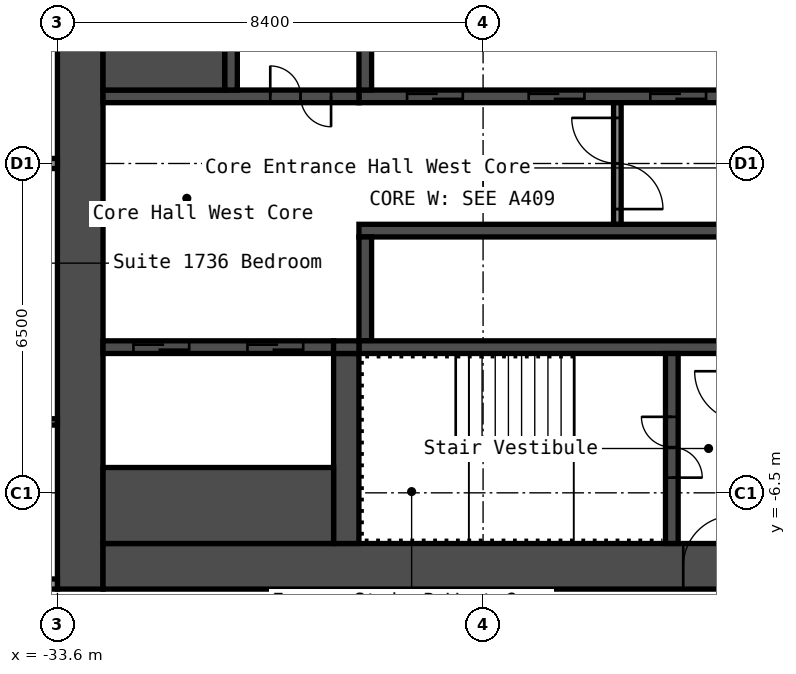
"""IFC4 building model, lengths in metres.
Left out: names, types, materials, properties, quantities, classifications, styles, units other than length and angle.
Written with IfcOpenShell. Run it as: python <this file> out.ifc"""

import sys

from ifc_helpers import new_model, si_unit, direction, frame, frame_2d, origin, place, context, subcontext, project, spatial, rectangle, extrude, element, fill, save


model = new_model("IFC4")
c1 = context("Model", 3, precision=1e-05, world=origin(), true_north=direction((0.0, 1.0)))
c2 = subcontext(c1, "Body", "Model", "MODEL_VIEW")
j1 = project(units=[si_unit("LENGTHUNIT", "METRE"), si_unit("PLANEANGLEUNIT", "RADIAN")], contexts=[c1])
p1 = place(None, origin())
s1 = spatial("IfcSite", under=j1, at=p1, CompositionType="ELEMENT")
p2 = place(p1, origin())
s2 = spatial("IfcBuilding", under=s1, at=p2, CompositionType="ELEMENT")
p3 = place(p2, frame((0.0, 0.0, 61.4)))
s3 = spatial("IfcBuildingStorey", under=s2, at=p3, CompositionType="ELEMENT", Elevation=61.4)
p4 = place(p3, frame((-33.15, -8.4, 0.0), z_axis=(0.0, 0.0, 1.0), x_axis=(0.0, 1.0, 0.0)))
e1 = element("IfcWall", 1, at=p4, inside=s3, PredefinedType="SHEAR", context=c2, shape_type="SweptSolid", body=[
    extrude(rectangle(XDim=16.8, YDim=0.9, at=frame_2d((8.4, 0.0))), origin(), (0.0, 0.0, 1.0), 2.9),
])
p5 = place(p3, frame((-32.7, -7.95, 0.0), z_axis=(0.0, 0.0, 1.0), x_axis=(1.0, 0.0, 0.0)))
e2 = element("IfcWall", 2, at=p5, inside=s3, PredefinedType="SHEAR", context=c2, shape_type="SweptSolid", body=[
    extrude(rectangle(XDim=15.0, YDim=0.9, at=frame_2d((7.5, 0.0))), origin(), (0.0, 0.0, 1.0), 2.9),
])
p6 = place(p5, frame((11.45, 0.0, 0.0)))
e3 = element("IfcOpeningElement", 3, at=p6, cuts=e2, PredefinedType="OPENING", context=c2, shape_type="SweptSolid", body=[
    extrude(rectangle(XDim=1.0, YDim=2.1, at=frame_2d((0.5, 1.05))), frame((0.0, 0.46, 0.0), z_axis=(0.0, -1.0, 0.0), x_axis=(1.0, 0.0, 0.0)), (0.0, 0.0, 1.0), 0.92),
])
p7 = place(p3, frame((-27.65, 1.325, 0.0), z_axis=(0.0, 0.0, 1.0), x_axis=(1.0, 0.0, 0.0)))
e4 = element("IfcWall", 4, at=p7, inside=s3, PredefinedType="SHEAR", context=c2, shape_type="SweptSolid", body=[
    extrude(rectangle(XDim=7.5, YDim=0.25, at=frame_2d((3.75, 0.0))), origin(), (0.0, 0.0, 1.0), 2.9),
])
p8 = place(p7, frame((5.75, 0.0, 0.0)))
e5 = element("IfcOpeningElement", 5, at=p8, cuts=e4, PredefinedType="OPENING", context=c2, shape_type="SweptSolid", body=[
    extrude(rectangle(XDim=1.1, YDim=2.1, at=frame_2d((0.55, 1.05))), frame((0.0, 0.135, 0.0), z_axis=(0.0, -1.0, 0.0), x_axis=(1.0, 0.0, 0.0)), (0.0, 0.0, 1.0), 0.27),
])
p9 = place(p7, frame((3.35, 0.0, 0.0)))
e6 = element("IfcOpeningElement", 6, at=p9, cuts=e4, PredefinedType="OPENING", context=c2, shape_type="SweptSolid", body=[
    extrude(rectangle(XDim=1.1, YDim=2.1, at=frame_2d((0.55, 1.05))), frame((0.0, 0.135, 0.0), z_axis=(0.0, -1.0, 0.0), x_axis=(1.0, 0.0, 0.0)), (0.0, 0.0, 1.0), 0.27),
])
p10 = place(p7, frame((0.95, 0.0, 0.0)))
e7 = element("IfcOpeningElement", 7, at=p10, cuts=e4, PredefinedType="OPENING", context=c2, shape_type="SweptSolid", body=[
    extrude(rectangle(XDim=1.1, YDim=2.1, at=frame_2d((0.55, 1.05))), frame((0.0, 0.135, 0.0), z_axis=(0.0, -1.0, 0.0), x_axis=(1.0, 0.0, 0.0)), (0.0, 0.0, 1.0), 0.27),
])
p11 = place(p3, frame((-27.525, 1.45, 0.0), z_axis=(0.0, 0.0, 1.0), x_axis=(0.0, 1.0, 0.0)))
e8 = element("IfcWall", 8, at=p11, inside=s3, PredefinedType="SHEAR", context=c2, shape_type="SweptSolid", body=[
    extrude(rectangle(XDim=2.05, YDim=0.25, at=frame_2d((1.025, 0.0))), origin(), (0.0, 0.0, 1.0), 2.9),
])
p12 = place(p3, frame((-32.7, 1.325, 0.0), z_axis=(0.0, 0.0, 1.0), x_axis=(1.0, 0.0, 0.0)))
e9 = element("IfcWall", 9, at=p12, inside=s3, PredefinedType="SHEAR", context=c2, shape_type="SweptSolid", body=[
    extrude(rectangle(XDim=5.05, YDim=0.25, at=frame_2d((2.525, 0.0))), origin(), (0.0, 0.0, 1.0), 2.9),
])
p13 = place(p12, frame((3.3, 0.0, 0.0)))
e10 = element("IfcOpeningElement", 10, at=p13, cuts=e9, PredefinedType="OPENING", context=c2, shape_type="SweptSolid", body=[
    extrude(rectangle(XDim=1.2, YDim=2.1, at=frame_2d((0.6, 1.05))), frame((0.0, 0.135, 0.0), z_axis=(0.0, -1.0, 0.0), x_axis=(1.0, 0.0, 0.0)), (0.0, 0.0, 1.0), 0.27),
])
p14 = place(p3, frame((-30.175, 1.45, 0.0), z_axis=(0.0, 0.0, 1.0), x_axis=(0.0, 1.0, 0.0)))
e11 = element("IfcWall", 11, at=p14, inside=s3, PredefinedType="SHEAR", context=c2, shape_type="SweptSolid", body=[
    extrude(rectangle(XDim=6.05, YDim=0.25, at=frame_2d((3.025, 0.0))), origin(), (0.0, 0.0, 1.0), 2.9),
])
p15 = place(p14, frame((2.625, 0.0, 0.0)))
e12 = element("IfcOpeningElement", 12, at=p15, cuts=e11, PredefinedType="OPENING", context=c2, shape_type="SweptSolid", body=[
    extrude(rectangle(XDim=1.1, YDim=2.1, at=frame_2d((0.55, 1.05))), frame((0.0, 0.135, 0.0), z_axis=(0.0, -1.0, 0.0), x_axis=(1.0, 0.0, 0.0)), (0.0, 0.0, 1.0), 0.27),
])
p16 = place(p3, frame((-32.7, 2.375, 0.0), z_axis=(0.0, 0.0, 1.0), x_axis=(1.0, 0.0, 0.0)))
e13 = element("IfcWall", 13, at=p16, inside=s3, PredefinedType="SHEAR", context=c2, shape_type="SweptSolid", body=[
    extrude(rectangle(XDim=2.4, YDim=1.85, at=frame_2d((1.2, 0.0))), origin(), (0.0, 0.0, 1.0), 2.9),
])
p17 = place(p3, frame((-27.65, -1.325, 0.0), z_axis=(0.0, 0.0, 1.0), x_axis=(1.0, 0.0, 0.0)))
e14 = element("IfcWall", 14, at=p17, inside=s3, PredefinedType="SHEAR", context=c2, shape_type="SweptSolid", body=[
    extrude(rectangle(XDim=7.5, YDim=0.25, at=frame_2d((3.75, 0.0))), origin(), (0.0, 0.0, 1.0), 2.9),
])
p18 = place(p3, frame((-27.525, -3.5, 0.0), z_axis=(0.0, 0.0, 1.0), x_axis=(0.0, 1.0, 0.0)))
e15 = element("IfcWall", 15, at=p18, inside=s3, PredefinedType="SHEAR", context=c2, shape_type="SweptSolid", body=[
    extrude(rectangle(XDim=2.05, YDim=0.25, at=frame_2d((1.025, 0.0))), origin(), (0.0, 0.0, 1.0), 2.9),
])
p19 = place(p3, frame((-27.65, -3.625, 0.0), z_axis=(0.0, 0.0, 1.0), x_axis=(1.0, 0.0, 0.0)))
e16 = element("IfcWall", 16, at=p19, inside=s3, PredefinedType="SHEAR", context=c2, shape_type="SweptSolid", body=[
    extrude(rectangle(XDim=7.5, YDim=0.25, at=frame_2d((3.75, 0.0))), origin(), (0.0, 0.0, 1.0), 2.9),
])
p20 = place(p3, frame((-21.475, -7.5, 0.0), z_axis=(0.0, 0.0, 1.0), x_axis=(0.0, 1.0, 0.0)))
e17 = element("IfcWall", 17, at=p20, inside=s3, PredefinedType="SHEAR", context=c2, shape_type="SweptSolid", body=[
    extrude(rectangle(XDim=3.75, YDim=0.25, at=frame_2d((1.875, 0.0))), origin(), (0.0, 0.0, 1.0), 2.9),
])
p21 = place(p20, frame((1.3, 0.0, 0.0)))
e18 = element("IfcOpeningElement", 18, at=p21, cuts=e17, PredefinedType="OPENING", context=c2, shape_type="SweptSolid", body=[
    extrude(rectangle(XDim=1.2, YDim=2.1, at=frame_2d((0.6, 1.05))), frame((0.0, 0.135, 0.0), z_axis=(0.0, -1.0, 0.0), x_axis=(1.0, 0.0, 0.0)), (0.0, 0.0, 1.0), 0.27),
])
p22 = place(p3, frame((-27.9, -7.5, 0.0), z_axis=(0.0, 0.0, 1.0), x_axis=(0.0, 1.0, 0.0)))
e19 = element("IfcWall", 19, at=p22, inside=s3, PredefinedType="SHEAR", context=c2, shape_type="SweptSolid", body=[
    extrude(rectangle(XDim=3.75, YDim=0.5, at=frame_2d((1.875, 0.0))), origin(), (0.0, 0.0, 1.0), 2.9),
])
p23 = place(p3, frame((-32.7, -3.625, 0.0), z_axis=(0.0, 0.0, 1.0), x_axis=(1.0, 0.0, 0.0)))
e20 = element("IfcWall", 20, at=p23, inside=s3, PredefinedType="SHEAR", context=c2, shape_type="SweptSolid", body=[
    extrude(rectangle(XDim=4.55, YDim=0.25, at=frame_2d((2.275, 0.0))), origin(), (0.0, 0.0, 1.0), 2.9),
])
p24 = place(p23, frame((2.85, 0.0, 0.0)))
e21 = element("IfcOpeningElement", 21, at=p24, cuts=e20, PredefinedType="OPENING", context=c2, shape_type="SweptSolid", body=[
    extrude(rectangle(XDim=1.1, YDim=2.1, at=frame_2d((0.55, 1.05))), frame((0.0, 0.135, 0.0), z_axis=(0.0, -1.0, 0.0), x_axis=(1.0, 0.0, 0.0)), (0.0, 0.0, 1.0), 0.27),
])
p25 = place(p23, frame((0.6, 0.0, 0.0)))
e22 = element("IfcOpeningElement", 22, at=p25, cuts=e20, PredefinedType="OPENING", context=c2, shape_type="SweptSolid", body=[
    extrude(rectangle(XDim=1.1, YDim=2.1, at=frame_2d((0.55, 1.05))), frame((0.0, 0.135, 0.0), z_axis=(0.0, -1.0, 0.0), x_axis=(1.0, 0.0, 0.0)), (0.0, 0.0, 1.0), 0.27),
])
p26 = place(p3, frame((-32.7, -6.75, 0.0), z_axis=(0.0, 0.0, 1.0), x_axis=(1.0, 0.0, 0.0)))
e23 = element("IfcWall", 23, at=p26, inside=s3, PredefinedType="SHEAR", context=c2, shape_type="SweptSolid", body=[
    extrude(rectangle(XDim=4.55, YDim=1.5, at=frame_2d((2.275, 0.0))), origin(), (0.0, 0.0, 1.0), 2.9),
])
p27 = place(p3, frame((-28.15, -3.625, 0.0), z_axis=(0.0, 0.0, 1.0), x_axis=(1.0, 0.0, 0.0)))
e24 = element("IfcWall", 24, at=p27, inside=s3, PredefinedType="SHEAR", context=c2, shape_type="SweptSolid", body=[
    extrude(rectangle(XDim=0.5, YDim=0.25, at=frame_2d((0.25, 0.0))), origin(), (0.0, 0.0, 1.0), 2.9),
])
p28 = place(p3, frame((-22.55, -1.2, 0.0), z_axis=(0.0, 0.0, 1.0), x_axis=(0.0, 1.0, 0.0)))
e25 = element("IfcWall", 25, at=p28, inside=s3, PredefinedType="PARTITIONING", context=c2, shape_type="SweptSolid", body=[
    extrude(rectangle(XDim=2.4, YDim=0.15, at=frame_2d((1.2, 0.0))), origin(), (0.0, 0.0, 1.0), 2.9),
])
p29 = place(p28, frame((0.3, 0.0, 0.0)))
e26 = element("IfcOpeningElement", 26, at=p29, cuts=e25, PredefinedType="OPENING", context=c2, shape_type="SweptSolid", body=[
    extrude(rectangle(XDim=1.8, YDim=2.1, at=frame_2d((0.9, 1.05))), frame((0.0, 0.085, 0.0), z_axis=(0.0, -1.0, 0.0), x_axis=(1.0, 0.0, 0.0)), (0.0, 0.0, 1.0), 0.17),
])
p30 = place(p3, frame((-48.6, -8.3, 0.0), z_axis=(0.0, 0.0, 1.0), x_axis=(1.0, 0.0, 0.0)))
e27 = element("IfcWall", 27, at=p30, inside=s3, PredefinedType="PARTITIONING", context=c2, shape_type="SweptSolid", body=[
    extrude(rectangle(XDim=15.0, YDim=0.2, at=frame_2d((7.5, 0.0))), origin(), (0.0, 0.0, 1.0), 2.9),
])
p31 = place(p30, frame((1.1, 0.0, 0.0)))
e28 = element("IfcOpeningElement", 28, at=p31, cuts=e27, PredefinedType="OPENING", context=c2, shape_type="SweptSolid", body=[
    extrude(rectangle(XDim=1.0, YDim=2.1, at=frame_2d((0.5, 1.05))), frame((0.0, 0.11, 0.0), z_axis=(0.0, -1.0, 0.0), x_axis=(1.0, 0.0, 0.0)), (0.0, 0.0, 1.0), 0.22),
])
p32 = place(p30, frame((8.2, 0.0, 0.0)))
e29 = element("IfcOpeningElement", 29, at=p32, cuts=e27, PredefinedType="OPENING", context=c2, shape_type="SweptSolid", body=[
    extrude(rectangle(XDim=1.0, YDim=2.1, at=frame_2d((0.5, 1.05))), frame((0.0, 0.11, 0.0), z_axis=(0.0, -1.0, 0.0), x_axis=(1.0, 0.0, 0.0)), (0.0, 0.0, 1.0), 0.22),
])
p33 = place(p3, frame((-36.538, -5.1, 0.0), z_axis=(0.0, 0.0, 1.0), x_axis=(1.0, 0.0, 0.0)))
e30 = element("IfcWall", 30, at=p33, inside=s3, PredefinedType="PARTITIONING", context=c2, shape_type="SweptSolid", body=[
    extrude(rectangle(XDim=2.938, YDim=0.125, at=frame_2d((1.469, 0.0))), origin(), (0.0, 0.0, 1.0), 2.9),
])
p34 = place(p33, frame((1.038, 0.0, 0.0)))
e31 = element("IfcOpeningElement", 31, at=p34, cuts=e30, PredefinedType="OPENING", context=c2, shape_type="SweptSolid", body=[
    extrude(rectangle(XDim=0.8, YDim=2.1, at=frame_2d((0.4, 1.05))), frame((0.0, 0.073, 0.0), z_axis=(0.0, -1.0, 0.0), x_axis=(1.0, 0.0, 0.0)), (0.0, 0.0, 1.0), 0.145),
])
p35 = place(p3, frame((-48.5, 0.0, 0.0), z_axis=(0.0, 0.0, 1.0), x_axis=(1.0, 0.0, 0.0)))
e32 = element("IfcWall", 32, at=p35, inside=s3, PredefinedType="PARTITIONING", context=c2, shape_type="SweptSolid", body=[
    extrude(rectangle(XDim=14.9, YDim=0.2, at=frame_2d((7.45, 0.0))), origin(), (0.0, 0.0, 1.0), 2.9),
])
p36 = place(p6, origin())
e33 = element("IfcDoor", 33, at=p36, inside=s3, OperationType="SINGLE_SWING_LEFT", PredefinedType="DOOR", context=c2, shape_type="SweptSolid", body=[
    extrude(rectangle(XDim=1.0, YDim=2.1, at=frame_2d((0.5, 1.05))), frame((0.0, 0.025, 0.0), z_axis=(0.0, -1.0, 0.0), x_axis=(1.0, 0.0, 0.0)), (0.0, 0.0, 1.0), 0.05),
])
fill(e3, e33)
p37 = place(p21, origin())
e34 = element("IfcDoor", 34, at=p37, inside=s3, OperationType="DOUBLE_DOOR_SINGLE_SWING", PredefinedType="DOOR", context=c2, shape_type="SweptSolid", body=[
    extrude(rectangle(XDim=1.2, YDim=2.1, at=frame_2d((0.6, 1.05))), frame((0.0, 0.025, 0.0), z_axis=(0.0, -1.0, 0.0), x_axis=(1.0, 0.0, 0.0)), (0.0, 0.0, 1.0), 0.05),
])
fill(e18, e34)
p38 = place(p13, origin())
e35 = element("IfcDoor", 35, at=p38, inside=s3, OperationType="DOUBLE_DOOR_SINGLE_SWING", PredefinedType="DOOR", context=c2, shape_type="SweptSolid", body=[
    extrude(rectangle(XDim=1.2, YDim=2.1, at=frame_2d((0.6, 1.05))), frame((0.0, 0.025, 0.0), z_axis=(0.0, -1.0, 0.0), x_axis=(1.0, 0.0, 0.0)), (0.0, 0.0, 1.0), 0.05),
])
fill(e10, e35)
p39 = place(p29, origin())
e36 = element("IfcDoor", 36, at=p39, inside=s3, OperationType="DOUBLE_DOOR_SINGLE_SWING", PredefinedType="DOOR", context=c2, shape_type="SweptSolid", body=[
    extrude(rectangle(XDim=1.8, YDim=2.1, at=frame_2d((0.9, 1.05))), frame((0.0, 0.025, 0.0), z_axis=(0.0, -1.0, 0.0), x_axis=(1.0, 0.0, 0.0)), (0.0, 0.0, 1.0), 0.05),
])
fill(e26, e36)
p40 = place(p8, origin())
e37 = element("IfcDoor", 37, at=p40, inside=s3, OperationType="DOUBLE_DOOR_SLIDING", PredefinedType="DOOR", context=c2, shape_type="SweptSolid", body=[
    extrude(rectangle(XDim=1.1, YDim=2.1, at=frame_2d((0.55, 1.05))), frame((0.0, 0.025, 0.0), z_axis=(0.0, -1.0, 0.0), x_axis=(1.0, 0.0, 0.0)), (0.0, 0.0, 1.0), 0.05),
])
fill(e5, e37)
p41 = place(p9, origin())
e38 = element("IfcDoor", 38, at=p41, inside=s3, OperationType="DOUBLE_DOOR_SLIDING", PredefinedType="DOOR", context=c2, shape_type="SweptSolid", body=[
    extrude(rectangle(XDim=1.1, YDim=2.1, at=frame_2d((0.55, 1.05))), frame((0.0, 0.025, 0.0), z_axis=(0.0, -1.0, 0.0), x_axis=(1.0, 0.0, 0.0)), (0.0, 0.0, 1.0), 0.05),
])
fill(e6, e38)
p42 = place(p10, origin())
e39 = element("IfcDoor", 39, at=p42, inside=s3, OperationType="DOUBLE_DOOR_SLIDING", PredefinedType="DOOR", context=c2, shape_type="SweptSolid", body=[
    extrude(rectangle(XDim=1.1, YDim=2.1, at=frame_2d((0.55, 1.05))), frame((0.0, 0.025, 0.0), z_axis=(0.0, -1.0, 0.0), x_axis=(1.0, 0.0, 0.0)), (0.0, 0.0, 1.0), 0.05),
])
fill(e7, e39)
p43 = place(p24, origin())
e40 = element("IfcDoor", 40, at=p43, inside=s3, OperationType="DOUBLE_DOOR_SLIDING", PredefinedType="DOOR", context=c2, shape_type="SweptSolid", body=[
    extrude(rectangle(XDim=1.1, YDim=2.1, at=frame_2d((0.55, 1.05))), frame((0.0, 0.025, 0.0), z_axis=(0.0, -1.0, 0.0), x_axis=(1.0, 0.0, 0.0)), (0.0, 0.0, 1.0), 0.05),
])
fill(e21, e40)
p44 = place(p25, origin())
e41 = element("IfcDoor", 41, at=p44, inside=s3, OperationType="DOUBLE_DOOR_SLIDING", PredefinedType="DOOR", context=c2, shape_type="SweptSolid", body=[
    extrude(rectangle(XDim=1.1, YDim=2.1, at=frame_2d((0.55, 1.05))), frame((0.0, 0.025, 0.0), z_axis=(0.0, -1.0, 0.0), x_axis=(1.0, 0.0, 0.0)), (0.0, 0.0, 1.0), 0.05),
])
fill(e22, e41)
save(model, sys.argv[1])
